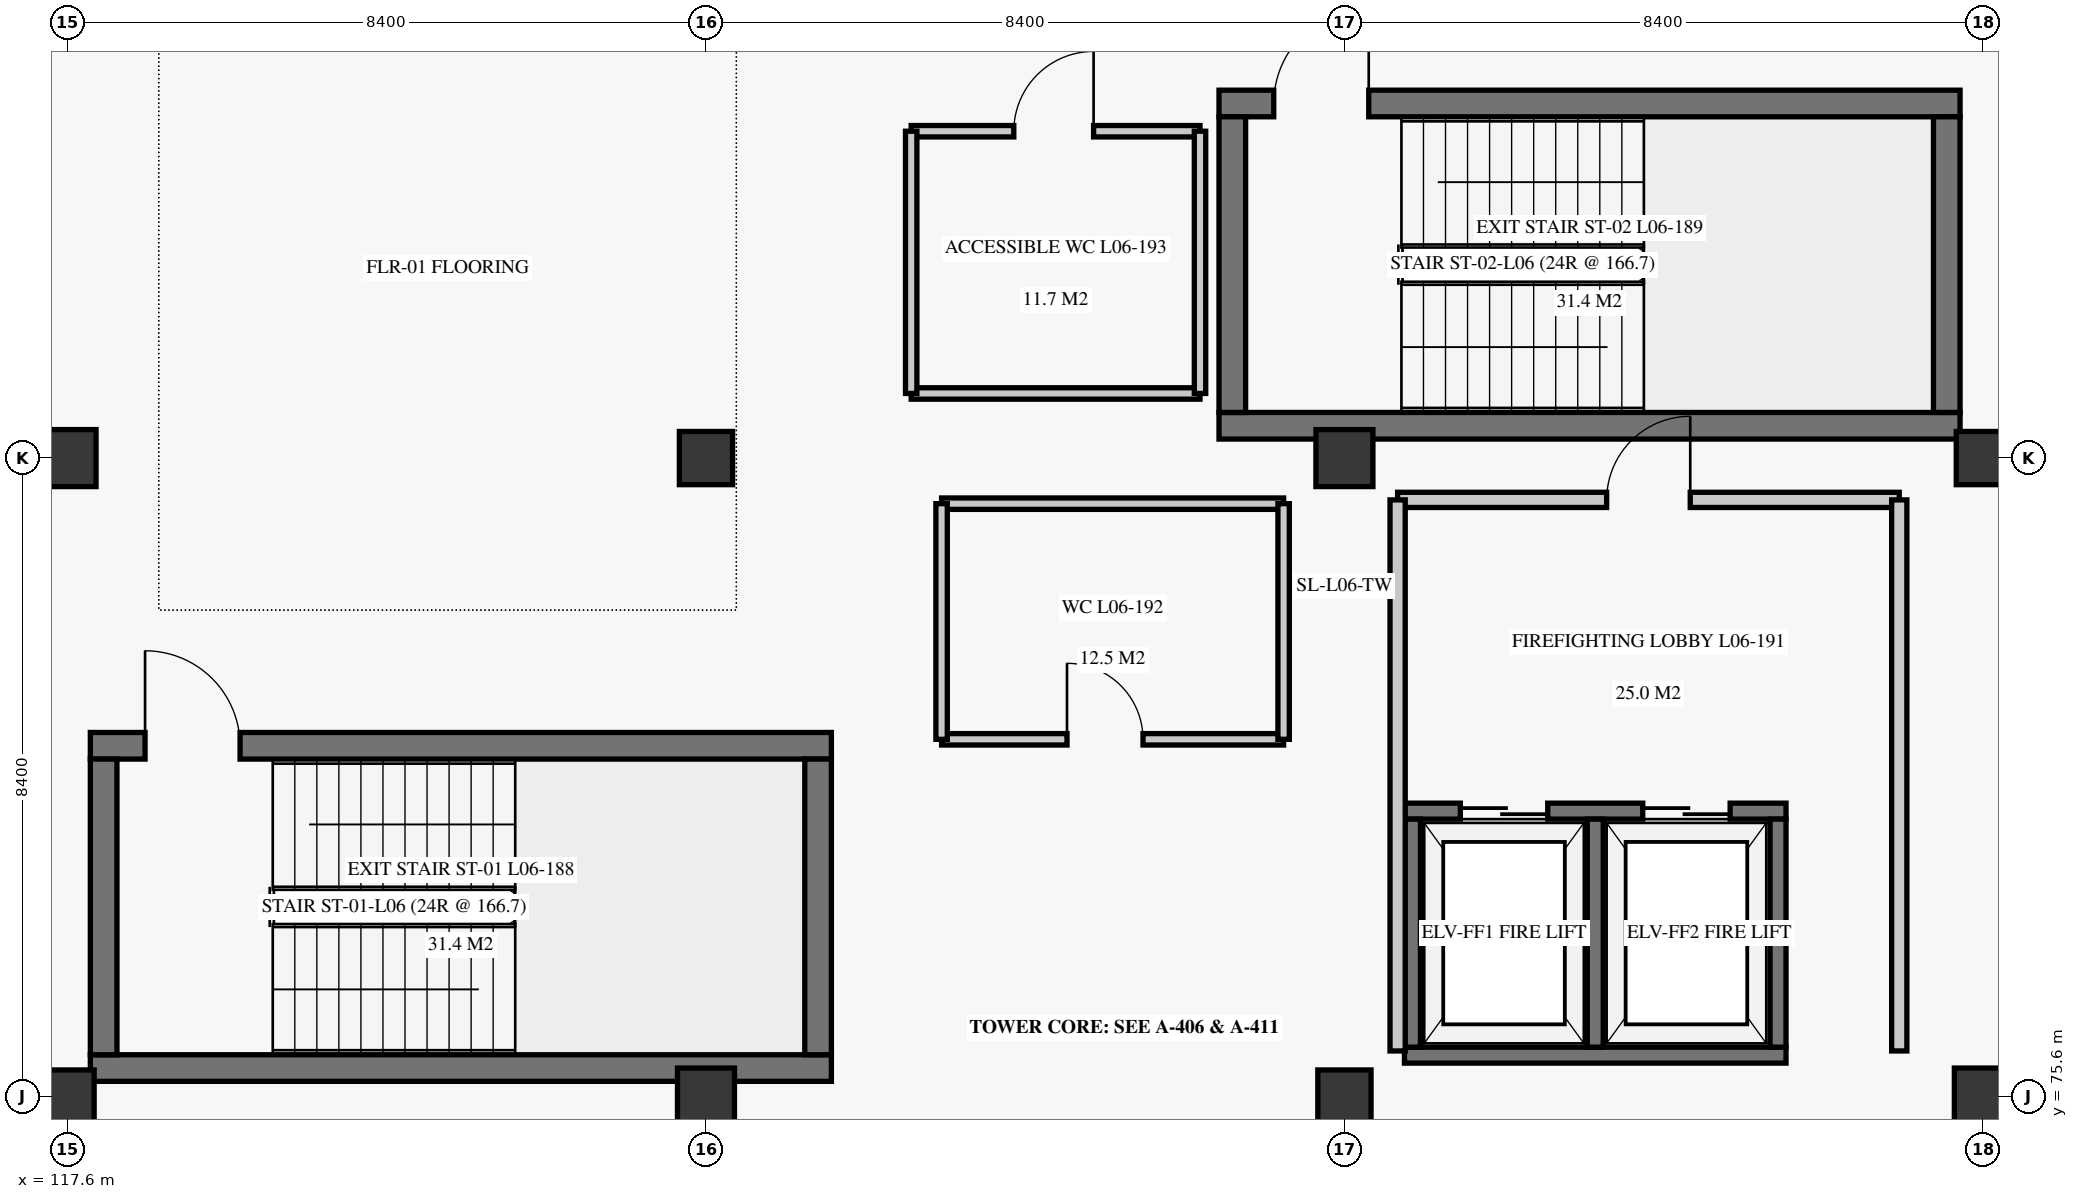
"""IFC4 building model, lengths in metres.
Left out: names, types, materials, properties, quantities, classifications, styles, units other than length and angle.
Written with IfcOpenShell. Run it as: python <this file> out.ifc"""

import sys

from ifc_helpers import new_model, si_unit, direction, frame, frame_2d, origin, origin_2d, place, context, subcontext, project, spatial, rectangle, extrude, element, fill, save


model = new_model("IFC4")
c1 = context("Model", 3, precision=1e-05, world=origin(), true_north=direction((0.0, 1.0)))
c2 = subcontext(c1, "Body", "Model", "MODEL_VIEW")
j1 = project(units=[si_unit("LENGTHUNIT", "METRE"), si_unit("PLANEANGLEUNIT", "RADIAN")], contexts=[c1])
p1 = place(None, origin())
s1 = spatial("IfcSite", under=j1, at=p1, CompositionType="ELEMENT")
p2 = place(p1, origin())
s2 = spatial("IfcBuilding", under=s1, at=p2, CompositionType="ELEMENT")
p3 = place(p2, frame((0.0, 0.0, 26.7)))
s3 = spatial("IfcBuildingStorey", under=s2, at=p3, CompositionType="ELEMENT", Elevation=26.7)
p4 = place(p3, frame((117.6, 75.6, 0.0), z_axis=(0.0, 0.0, 1.0), x_axis=(1.0, 0.0, 0.0)))
e1 = element("IfcColumn", 1, at=p4, inside=s3, PredefinedType="COLUMN", context=c2, shape_type="SweptSolid", body=[
    extrude(rectangle(XDim=0.7, YDim=0.7, at=origin_2d()), origin(), (0.0, 0.0, 1.0), 3.72),
])
for number, where, z_axis, x_axis in (
    (2, (117.6, 84.0, 0.0), (0.0, 0.0, 1.0), (1.0, 0.0, 0.0)),
    (3, (126.0, 75.6, 0.0), (0.0, 0.0, 1.0), (1.0, 0.0, 0.0)),
):
    element("IfcColumn", number, at=place(p3, frame(where, z_axis=z_axis, x_axis=x_axis)), inside=s3, PredefinedType="COLUMN", context=c2, shape_type="SweptSolid", body=[
        extrude(rectangle(XDim=0.75, YDim=0.75, at=origin_2d()), origin(), (0.0, 0.0, 1.0), 3.72),
    ])
for number, where, z_axis, x_axis in (
    (4, (126.0, 84.0, 0.0), (0.0, 0.0, 1.0), (1.0, 0.0, 0.0)),
    (5, (134.4, 75.6, 0.0), (0.0, 0.0, 1.0), (1.0, 0.0, 0.0)),
):
    element("IfcColumn", number, at=place(p3, frame(where, z_axis=z_axis, x_axis=x_axis)), inside=s3, PredefinedType="COLUMN", context=c2, shape_type="SweptSolid", body=[
        extrude(rectangle(XDim=0.7, YDim=0.7, at=origin_2d()), origin(), (0.0, 0.0, 1.0), 3.72),
    ])
for number, where, z_axis, x_axis in (
    (6, (134.4, 84.0, 0.0), (0.0, 0.0, 1.0), (1.0, 0.0, 0.0)),
    (7, (142.8, 75.6, 0.0), (0.0, 0.0, 1.0), (1.0, 0.0, 0.0)),
):
    element("IfcColumn", number, at=place(p3, frame(where, z_axis=z_axis, x_axis=x_axis)), inside=s3, PredefinedType="COLUMN", context=c2, shape_type="SweptSolid", body=[
        extrude(rectangle(XDim=0.75, YDim=0.75, at=origin_2d()), origin(), (0.0, 0.0, 1.0), 3.72),
    ])
p5 = place(p3, frame((142.8, 84.0, 0.0), z_axis=(0.0, 0.0, 1.0), x_axis=(1.0, 0.0, 0.0)))
e8 = element("IfcColumn", 8, at=p5, inside=s3, PredefinedType="COLUMN", context=c2, shape_type="SweptSolid", body=[
    extrude(rectangle(XDim=0.7, YDim=0.7, at=origin_2d()), origin(), (0.0, 0.0, 1.0), 3.72),
])
p6 = place(p3, frame((117.9, 75.975, 0.0), z_axis=(0.0, 0.0, 1.0), x_axis=(1.0, 0.0, 0.0)))
e9 = element("IfcWall", 9, at=p6, inside=s3, PredefinedType="SHEAR", context=c2, shape_type="SweptSolid", body=[
    extrude(rectangle(XDim=9.75, YDim=0.35, at=frame_2d((4.875, 0.0))), origin(), (0.0, 0.0, 1.0), 3.72),
])
p7 = place(p3, frame((117.9, 80.215, 0.0), z_axis=(0.0, 0.0, 1.0), x_axis=(1.0, 0.0, 0.0)))
e10 = element("IfcWall", 10, at=p7, inside=s3, PredefinedType="SHEAR", context=c2, shape_type="SweptSolid", body=[
    extrude(rectangle(XDim=9.75, YDim=0.35, at=frame_2d((4.875, 0.0))), origin(), (0.0, 0.0, 1.0), 3.72),
])
p8 = place(p7, frame((0.72, 0.0, 0.0)))
e11 = element("IfcOpeningElement", 11, at=p8, cuts=e10, PredefinedType="OPENING", context=c2, shape_type="SweptSolid", body=[
    extrude(rectangle(XDim=1.25, YDim=2.2, at=frame_2d((0.625, 1.1))), frame((0.0, 0.185, 0.0), z_axis=(0.0, -1.0, 0.0), x_axis=(1.0, 0.0, 0.0)), (0.0, 0.0, 1.0), 0.37),
])
for number, where, z_axis, x_axis in (
    (12, (118.075, 76.15, 0.0), (0.0, 0.0, 1.0), (0.0, 1.0, 0.0)),
    (13, (127.475, 76.15, 0.0), (0.0, 0.0, 1.0), (0.0, 1.0, 0.0)),
):
    element("IfcWall", number, at=place(p3, frame(where, z_axis=z_axis, x_axis=x_axis)), inside=s3, PredefinedType="SHEAR", context=c2, shape_type="SweptSolid", body=[
        extrude(rectangle(XDim=3.89, YDim=0.35, at=frame_2d((1.945, 0.0))), origin(), (0.0, 0.0, 1.0), 3.72),
    ])
p9 = place(p3, frame((132.75, 84.425, 0.0), z_axis=(0.0, 0.0, 1.0), x_axis=(1.0, 0.0, 0.0)))
e14 = element("IfcWall", 14, at=p9, inside=s3, PredefinedType="SHEAR", context=c2, shape_type="SweptSolid", body=[
    extrude(rectangle(XDim=9.75, YDim=0.35, at=frame_2d((4.875, 0.0))), origin(), (0.0, 0.0, 1.0), 3.72),
])
p10 = place(p3, frame((132.75, 88.665, 0.0), z_axis=(0.0, 0.0, 1.0), x_axis=(1.0, 0.0, 0.0)))
e15 = element("IfcWall", 15, at=p10, inside=s3, PredefinedType="SHEAR", context=c2, shape_type="SweptSolid", body=[
    extrude(rectangle(XDim=9.75, YDim=0.35, at=frame_2d((4.875, 0.0))), origin(), (0.0, 0.0, 1.0), 3.72),
])
p11 = place(p10, frame((0.72, 0.0, 0.0)))
e16 = element("IfcOpeningElement", 16, at=p11, cuts=e15, PredefinedType="OPENING", context=c2, shape_type="SweptSolid", body=[
    extrude(rectangle(XDim=1.25, YDim=2.2, at=frame_2d((0.625, 1.1))), frame((0.0, 0.185, 0.0), z_axis=(0.0, -1.0, 0.0), x_axis=(1.0, 0.0, 0.0)), (0.0, 0.0, 1.0), 0.37),
])
for number, where, z_axis, x_axis in (
    (17, (132.925, 84.6, 0.0), (0.0, 0.0, 1.0), (0.0, 1.0, 0.0)),
    (18, (142.325, 84.6, 0.0), (0.0, 0.0, 1.0), (0.0, 1.0, 0.0)),
):
    element("IfcWall", number, at=place(p3, frame(where, z_axis=z_axis, x_axis=x_axis)), inside=s3, PredefinedType="SHEAR", context=c2, shape_type="SweptSolid", body=[
        extrude(rectangle(XDim=3.89, YDim=0.35, at=frame_2d((1.945, 0.0))), origin(), (0.0, 0.0, 1.0), 3.72),
    ])
p12 = place(p3, frame((135.19, 76.145, 0.0), z_axis=(0.0, 0.0, 1.0), x_axis=(1.0, 0.0, 0.0)))
e19 = element("IfcWall", 19, at=p12, inside=s3, PredefinedType="SHEAR", context=c2, shape_type="SweptSolid", body=[
    extrude(rectangle(XDim=5.02, YDim=0.21, at=frame_2d((2.51, 0.0))), origin(), (0.0, 0.0, 1.0), 3.72),
])
p13 = place(p3, frame((135.19, 79.355, 0.0), z_axis=(0.0, 0.0, 1.0), x_axis=(1.0, 0.0, 0.0)))
e20 = element("IfcWall", 20, at=p13, inside=s3, PredefinedType="SHEAR", context=c2, shape_type="SweptSolid", body=[
    extrude(rectangle(XDim=5.02, YDim=0.21, at=frame_2d((2.51, 0.0))), origin(), (0.0, 0.0, 1.0), 3.72),
])
p14 = place(p13, frame((0.735, 0.0, 0.0)))
e21 = element("IfcOpeningElement", 21, at=p14, cuts=e20, PredefinedType="OPENING", context=c2, shape_type="SweptSolid", body=[
    extrude(rectangle(XDim=1.15, YDim=2.2, at=frame_2d((0.575, 1.1))), frame((0.0, 0.115, 0.0), z_axis=(0.0, -1.0, 0.0), x_axis=(1.0, 0.0, 0.0)), (0.0, 0.0, 1.0), 0.23),
])
p15 = place(p13, frame((3.135, 0.0, 0.0)))
e22 = element("IfcOpeningElement", 22, at=p15, cuts=e20, PredefinedType="OPENING", context=c2, shape_type="SweptSolid", body=[
    extrude(rectangle(XDim=1.15, YDim=2.2, at=frame_2d((0.575, 1.1))), frame((0.0, 0.115, 0.0), z_axis=(0.0, -1.0, 0.0), x_axis=(1.0, 0.0, 0.0)), (0.0, 0.0, 1.0), 0.23),
])
for number, where, z_axis, x_axis in (
    (23, (135.295, 76.25, 0.0), (0.0, 0.0, 1.0), (0.0, 1.0, 0.0)),
    (24, (140.105, 76.25, 0.0), (0.0, 0.0, 1.0), (0.0, 1.0, 0.0)),
    (25, (137.7, 76.25, 0.0), (0.0, 0.0, 1.0), (0.0, 1.0, 0.0)),
):
    element("IfcWall", number, at=place(p3, frame(where, z_axis=z_axis, x_axis=x_axis)), inside=s3, PredefinedType="SHEAR", context=c2, shape_type="SweptSolid", body=[
        extrude(rectangle(XDim=3.0, YDim=0.21, at=frame_2d((1.5, 0.0))), origin(), (0.0, 0.0, 1.0), 3.72),
    ])
p16 = place(p3, frame((135.1, 83.45, 0.0), z_axis=(0.0, 0.0, 1.0), x_axis=(1.0, 0.0, 0.0)))
e26 = element("IfcWall", 26, at=p16, inside=s3, PredefinedType="PARTITIONING", context=c2, shape_type="SweptSolid", body=[
    extrude(rectangle(XDim=6.6, YDim=0.2, at=frame_2d((3.3, 0.0))), origin(), (0.0, 0.0, 1.0), 3.34),
])
p17 = place(p16, frame((2.75, 0.0, 0.0)))
e27 = element("IfcOpeningElement", 27, at=p17, cuts=e26, PredefinedType="OPENING", context=c2, shape_type="SweptSolid", body=[
    extrude(rectangle(XDim=1.1, YDim=2.2, at=frame_2d((0.55, 1.1))), frame((0.0, 0.11, 0.0), z_axis=(0.0, -1.0, 0.0), x_axis=(1.0, 0.0, 0.0)), (0.0, 0.0, 1.0), 0.22),
])
for number, where, z_axis, x_axis in (
    (28, (135.1, 76.2, 0.0), (0.0, 0.0, 1.0), (0.0, 1.0, 0.0)),
    (29, (141.7, 76.2, 0.0), (0.0, 0.0, 1.0), (0.0, 1.0, 0.0)),
):
    element("IfcWall", number, at=place(p3, frame(where, z_axis=z_axis, x_axis=x_axis)), inside=s3, PredefinedType="PARTITIONING", context=c2, shape_type="SweptSolid", body=[
        extrude(rectangle(XDim=7.25, YDim=0.2, at=frame_2d((3.625, 0.0))), origin(), (0.0, 0.0, 1.0), 3.34),
    ])
p18 = place(p3, frame((129.1, 80.3, 0.0), z_axis=(0.0, 0.0, 1.0), x_axis=(1.0, 0.0, 0.0)))
e30 = element("IfcWall", 30, at=p18, inside=s3, PredefinedType="PARTITIONING", context=c2, shape_type="SweptSolid", body=[
    extrude(rectangle(XDim=4.5, YDim=0.15, at=frame_2d((2.25, 0.0))), origin(), (0.0, 0.0, 1.0), 3.34),
])
p19 = place(p18, frame((1.65, 0.0, 0.0)))
e31 = element("IfcOpeningElement", 31, at=p19, cuts=e30, PredefinedType="OPENING", context=c2, shape_type="SweptSolid", body=[
    extrude(rectangle(XDim=1.0, YDim=2.1, at=frame_2d((0.5, 1.05))), frame((0.0, 0.085, 0.0), z_axis=(0.0, -1.0, 0.0), x_axis=(1.0, 0.0, 0.0)), (0.0, 0.0, 1.0), 0.17),
])
p20 = place(p3, frame((129.1, 83.4, 0.0), z_axis=(0.0, 0.0, 1.0), x_axis=(1.0, 0.0, 0.0)))
e32 = element("IfcWall", 32, at=p20, inside=s3, PredefinedType="PARTITIONING", context=c2, shape_type="SweptSolid", body=[
    extrude(rectangle(XDim=4.5, YDim=0.15, at=frame_2d((2.25, 0.0))), origin(), (0.0, 0.0, 1.0), 3.34),
])
for number, where, z_axis, x_axis in (
    (33, (129.1, 80.3, 0.0), (0.0, 0.0, 1.0), (0.0, 1.0, 0.0)),
    (34, (133.6, 80.3, 0.0), (0.0, 0.0, 1.0), (0.0, 1.0, 0.0)),
):
    element("IfcWall", number, at=place(p3, frame(where, z_axis=z_axis, x_axis=x_axis)), inside=s3, PredefinedType="PARTITIONING", context=c2, shape_type="SweptSolid", body=[
        extrude(rectangle(XDim=3.1, YDim=0.15, at=frame_2d((1.55, 0.0))), origin(), (0.0, 0.0, 1.0), 3.34),
    ])
p21 = place(p3, frame((128.7, 88.3, 0.0), z_axis=(0.0, 0.0, 1.0), x_axis=(1.0, 0.0, 0.0)))
e35 = element("IfcWall", 35, at=p21, inside=s3, PredefinedType="PARTITIONING", context=c2, shape_type="SweptSolid", body=[
    extrude(rectangle(XDim=3.8, YDim=0.15, at=frame_2d((1.9, 0.0))), origin(), (0.0, 0.0, 1.0), 3.34),
])
p22 = place(p21, frame((1.35, 0.0, 0.0)))
e36 = element("IfcOpeningElement", 36, at=p22, cuts=e35, PredefinedType="OPENING", context=c2, shape_type="SweptSolid", body=[
    extrude(rectangle(XDim=1.05, YDim=2.15, at=frame_2d((0.525, 1.075))), frame((0.0, 0.085, 0.0), z_axis=(0.0, -1.0, 0.0), x_axis=(1.0, 0.0, 0.0)), (0.0, 0.0, 1.0), 0.17),
])
p23 = place(p3, frame((128.7, 84.85, 0.0), z_axis=(0.0, 0.0, 1.0), x_axis=(1.0, 0.0, 0.0)))
e37 = element("IfcWall", 37, at=p23, inside=s3, PredefinedType="PARTITIONING", context=c2, shape_type="SweptSolid", body=[
    extrude(rectangle(XDim=3.8, YDim=0.15, at=frame_2d((1.9, 0.0))), origin(), (0.0, 0.0, 1.0), 3.34),
])
for number, where, z_axis, x_axis in (
    (38, (128.7, 84.85, 0.0), (0.0, 0.0, 1.0), (0.0, 1.0, 0.0)),
    (39, (132.5, 84.85, 0.0), (0.0, 0.0, 1.0), (0.0, 1.0, 0.0)),
):
    element("IfcWall", number, at=place(p3, frame(where, z_axis=z_axis, x_axis=x_axis)), inside=s3, PredefinedType="PARTITIONING", context=c2, shape_type="SweptSolid", body=[
        extrude(rectangle(XDim=3.45, YDim=0.15, at=frame_2d((1.725, 0.0))), origin(), (0.0, 0.0, 1.0), 3.34),
    ])
p24 = place(p8, origin())
e40 = element("IfcDoor", 40, at=p24, inside=s3, OperationType="SINGLE_SWING_LEFT", PredefinedType="DOOR", context=c2, shape_type="SweptSolid", body=[
    extrude(rectangle(XDim=1.25, YDim=2.2, at=frame_2d((0.625, 1.1))), frame((0.0, 0.025, 0.0), z_axis=(0.0, -1.0, 0.0), x_axis=(1.0, 0.0, 0.0)), (0.0, 0.0, 1.0), 0.05),
])
fill(e11, e40)
p25 = place(p11, origin())
e41 = element("IfcDoor", 41, at=p25, inside=s3, OperationType="SINGLE_SWING_RIGHT", PredefinedType="DOOR", context=c2, shape_type="SweptSolid", body=[
    extrude(rectangle(XDim=1.25, YDim=2.2, at=frame_2d((0.625, 1.1))), frame((0.0, 0.025, 0.0), z_axis=(0.0, -1.0, 0.0), x_axis=(1.0, 0.0, 0.0)), (0.0, 0.0, 1.0), 0.05),
])
fill(e16, e41)
p26 = place(p14, origin())
e42 = element("IfcDoor", 42, at=p26, inside=s3, OperationType="DOUBLE_DOOR_SLIDING", PredefinedType="DOOR", context=c2, shape_type="SweptSolid", body=[
    extrude(rectangle(XDim=1.15, YDim=2.2, at=frame_2d((0.575, 1.1))), frame((0.0, 0.025, 0.0), z_axis=(0.0, -1.0, 0.0), x_axis=(1.0, 0.0, 0.0)), (0.0, 0.0, 1.0), 0.05),
])
fill(e21, e42)
p27 = place(p15, origin())
e43 = element("IfcDoor", 43, at=p27, inside=s3, OperationType="DOUBLE_DOOR_SLIDING", PredefinedType="DOOR", context=c2, shape_type="SweptSolid", body=[
    extrude(rectangle(XDim=1.15, YDim=2.2, at=frame_2d((0.575, 1.1))), frame((0.0, 0.025, 0.0), z_axis=(0.0, -1.0, 0.0), x_axis=(1.0, 0.0, 0.0)), (0.0, 0.0, 1.0), 0.05),
])
fill(e22, e43)
p28 = place(p17, origin())
e44 = element("IfcDoor", 44, at=p28, inside=s3, OperationType="SINGLE_SWING_RIGHT", PredefinedType="DOOR", context=c2, shape_type="SweptSolid", body=[
    extrude(rectangle(XDim=1.1, YDim=2.2, at=frame_2d((0.55, 1.1))), frame((0.0, 0.025, 0.0), z_axis=(0.0, -1.0, 0.0), x_axis=(1.0, 0.0, 0.0)), (0.0, 0.0, 1.0), 0.05),
])
fill(e27, e44)
p29 = place(p19, origin())
e45 = element("IfcDoor", 45, at=p29, inside=s3, OperationType="SINGLE_SWING_LEFT", PredefinedType="DOOR", context=c2, shape_type="SweptSolid", body=[
    extrude(rectangle(XDim=1.0, YDim=2.1, at=frame_2d((0.5, 1.05))), frame((0.0, 0.025, 0.0), z_axis=(0.0, -1.0, 0.0), x_axis=(1.0, 0.0, 0.0)), (0.0, 0.0, 1.0), 0.05),
])
fill(e31, e45)
p30 = place(p22, origin())
e46 = element("IfcDoor", 46, at=p30, inside=s3, OperationType="SINGLE_SWING_RIGHT", PredefinedType="DOOR", context=c2, shape_type="SweptSolid", body=[
    extrude(rectangle(XDim=1.05, YDim=2.15, at=frame_2d((0.525, 1.075))), frame((0.0, 0.025, 0.0), z_axis=(0.0, -1.0, 0.0), x_axis=(1.0, 0.0, 0.0)), (0.0, 0.0, 1.0), 0.05),
])
fill(e36, e46)
save(model, sys.argv[1])
